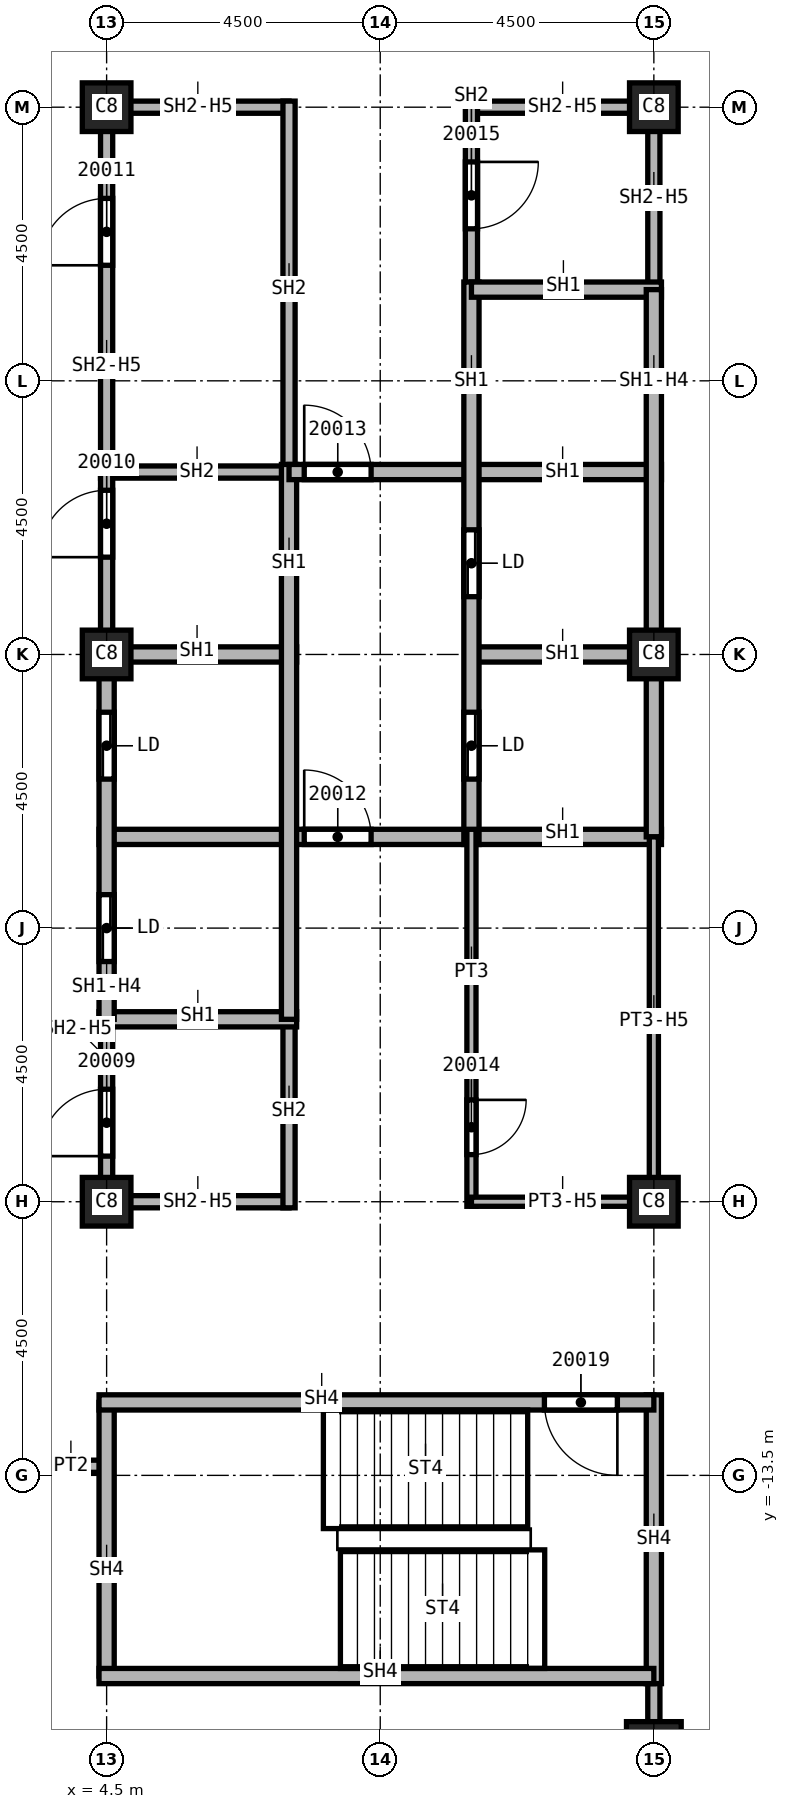
"""IFC4 building model, lengths in metres.
Left out: names, types, materials, properties, quantities, classifications, styles, units other than length and angle.
Written with IfcOpenShell. Run it as: python <this file> out.ifc"""

import sys

from ifc_helpers import new_model, si_unit, direction, frame, frame_2d, origin, origin_2d, place, context, subcontext, project, spatial, rectangle, extrude, element, fill, save


model = new_model("IFC4")
c1 = context("Model", 3, precision=1e-05, world=origin(), true_north=direction((0.0, 1.0)))
c2 = subcontext(c1, "Body", "Model", "MODEL_VIEW")
j1 = project(units=[si_unit("LENGTHUNIT", "METRE"), si_unit("PLANEANGLEUNIT", "RADIAN")], contexts=[c1])
p1 = place(None, origin())
s1 = spatial("IfcSite", under=j1, at=p1, CompositionType="ELEMENT")
p2 = place(p1, origin())
s2 = spatial("IfcBuilding", under=s1, at=p2, CompositionType="ELEMENT")
p3 = place(p2, frame((0.0, 0.0, 290.0)))
s3 = spatial("IfcBuildingStorey", under=s2, at=p3, CompositionType="ELEMENT", Elevation=290.0)
p4 = place(p3, frame((13.5, -18.0, 0.0), z_axis=(0.0, 0.0, 1.0), x_axis=(1.0, 0.0, 0.0)))
e1 = element("IfcColumn", 1, at=p4, inside=s3, PredefinedType="COLUMN", context=c2, shape_type="SweptSolid", body=[
    extrude(rectangle(XDim=0.9, YDim=0.9, at=origin_2d()), origin(), (0.0, 0.0, 1.0), 3.59),
])
for number, where, z_axis, x_axis in (
    (2, (4.5, 0.0, 0.0), (0.0, 0.0, 1.0), (1.0, 0.0, 0.0)),
    (3, (4.5, 9.0, 0.0), (0.0, 0.0, 1.0), (1.0, 0.0, 0.0)),
    (4, (4.5, -9.0, 0.0), (0.0, 0.0, 1.0), (1.0, 0.0, 0.0)),
    (5, (13.5, 0.0, 0.0), (0.0, 0.0, 1.0), (1.0, 0.0, 0.0)),
    (6, (13.5, 9.0, 0.0), (0.0, 0.0, 1.0), (1.0, 0.0, 0.0)),
    (7, (13.5, -9.0, 0.0), (0.0, 0.0, 1.0), (1.0, 0.0, 0.0)),
):
    element("IfcColumn", number, at=place(p3, frame(where, z_axis=z_axis, x_axis=x_axis)), inside=s3, PredefinedType="COLUMN", context=c2, shape_type="SweptSolid", body=[
        extrude(rectangle(XDim=0.8, YDim=0.8, at=origin_2d()), origin(), (0.0, 0.0, 1.0), 3.59),
    ])
p5 = place(p3, frame((4.5, -13.35, 0.0), z_axis=(0.0, 0.0, 1.0), x_axis=(-1.0, 0.0, 0.0)))
e8 = element("IfcWall", 8, at=p5, inside=s3, PredefinedType="PARTITIONING", context=c2, shape_type="SweptSolid", body=[
    extrude(rectangle(XDim=1.05, YDim=0.2, at=frame_2d((0.525, 0.0))), origin(), (0.0, 0.0, 1.0), 3.59),
])
p6 = place(p3, frame((13.5, -21.9, 0.0), z_axis=(0.0, 0.0, 1.0), x_axis=(0.0, 1.0, 0.0)))
e9 = element("IfcWall", 9, at=p6, inside=s3, PredefinedType="PARTITIONING", context=c2, shape_type="SweptSolid", body=[
    extrude(rectangle(XDim=5.225, YDim=0.2, at=frame_2d((2.612, 0.0))), origin(), (0.0, 0.0, 1.0), 3.59),
])
p7 = place(p6, frame((0.4, 0.0, 0.0)))
e10 = element("IfcOpeningElement", 10, at=p7, cuts=e9, PredefinedType="OPENING", context=c2, shape_type="SweptSolid", body=[
    extrude(rectangle(XDim=1.0, YDim=2.1, at=frame_2d((0.5, 1.05))), frame((0.0, 0.1, 0.0), z_axis=(0.0, -1.0, 0.0), x_axis=(1.0, 0.0, 0.0)), (0.0, 0.0, 1.0), 0.2),
])
p8 = place(p3, frame((4.4, 3.0, 0.0), z_axis=(0.0, 0.0, 1.0), x_axis=(1.0, 0.0, 0.0)))
e11 = element("IfcWall", 11, at=p8, inside=s3, PredefinedType="SOLIDWALL", context=c2, shape_type="SweptSolid", body=[
    extrude(rectangle(XDim=3.225, YDim=0.2, at=frame_2d((1.613, 0.0))), origin(), (0.0, 0.0, 1.0), 3.59),
])
p9 = place(p3, frame((4.5, -9.1, 0.0), z_axis=(0.0, 0.0, 1.0), x_axis=(0.0, 1.0, 0.0)))
e12 = element("IfcWall", 12, at=p9, inside=s3, PredefinedType="SOLIDWALL", context=c2, shape_type="SweptSolid", body=[
    extrude(rectangle(XDim=3.1, YDim=0.2, at=frame_2d((1.55, 0.0))), origin(), (0.0, 0.0, 1.0), 2.828),
])
p10 = place(p9, frame((0.85, 0.0, 0.0)))
e13 = element("IfcOpeningElement", 13, at=p10, cuts=e12, PredefinedType="OPENING", context=c2, shape_type="SweptSolid", body=[
    extrude(rectangle(XDim=1.1, YDim=2.1, at=frame_2d((0.55, 1.05))), frame((0.0, 0.1, 0.0), z_axis=(0.0, -1.0, 0.0), x_axis=(1.0, 0.0, 0.0)), (0.0, 0.0, 1.0), 0.2),
])
p11 = place(p3, frame((4.5, 0.0, 0.0), z_axis=(0.0, 0.0, 1.0), x_axis=(0.0, 1.0, 0.0)))
e14 = element("IfcWall", 14, at=p11, inside=s3, PredefinedType="SOLIDWALL", context=c2, shape_type="SweptSolid", body=[
    extrude(rectangle(XDim=9.1, YDim=0.2, at=frame_2d((4.55, 0.0))), origin(), (0.0, 0.0, 1.0), 2.828),
])
p12 = place(p11, frame((1.6, 0.0, 0.0)))
e15 = element("IfcOpeningElement", 15, at=p12, cuts=e14, PredefinedType="OPENING", context=c2, shape_type="SweptSolid", body=[
    extrude(rectangle(XDim=1.1, YDim=2.1, at=frame_2d((0.55, 1.05))), frame((0.0, 0.1, 0.0), z_axis=(0.0, -1.0, 0.0), x_axis=(1.0, 0.0, 0.0)), (0.0, 0.0, 1.0), 0.2),
])
p13 = place(p11, frame((6.4, 0.0, 0.0)))
e16 = element("IfcOpeningElement", 16, at=p13, cuts=e14, PredefinedType="OPENING", context=c2, shape_type="SweptSolid", body=[
    extrude(rectangle(XDim=1.1, YDim=2.1, at=frame_2d((0.55, 1.05))), frame((0.0, 0.1, 0.0), z_axis=(0.0, -1.0, 0.0), x_axis=(1.0, 0.0, 0.0)), (0.0, 0.0, 1.0), 0.2),
])
for number, where, z_axis, x_axis in (
    (17, (4.5, 9.0, 0.0), (0.0, 0.0, 1.0), (1.0, 0.0, 0.0)),
    (18, (7.5, -9.0, 0.0), (0.0, 0.0, 1.0), (-1.0, 0.0, 0.0)),
):
    element("IfcWall", number, at=place(p3, frame(where, z_axis=z_axis, x_axis=x_axis)), inside=s3, PredefinedType="SOLIDWALL", context=c2, shape_type="SweptSolid", body=[
        extrude(rectangle(XDim=3.0, YDim=0.2, at=frame_2d((1.5, 0.0))), origin(), (0.0, 0.0, 1.0), 2.828),
    ])
p14 = place(p3, frame((7.5, -6.0, 0.0), z_axis=(0.0, 0.0, 1.0), x_axis=(0.0, -1.0, 0.0)))
e19 = element("IfcWall", 19, at=p14, inside=s3, PredefinedType="SOLIDWALL", context=c2, shape_type="SweptSolid", body=[
    extrude(rectangle(XDim=3.1, YDim=0.2, at=frame_2d((1.55, 0.0))), origin(), (0.0, 0.0, 1.0), 3.59),
])
p15 = place(p3, frame((7.5, 9.1, 0.0), z_axis=(0.0, 0.0, 1.0), x_axis=(0.0, -1.0, 0.0)))
e20 = element("IfcWall", 20, at=p15, inside=s3, PredefinedType="SOLIDWALL", context=c2, shape_type="SweptSolid", body=[
    extrude(rectangle(XDim=6.225, YDim=0.2, at=frame_2d((3.113, 0.0))), origin(), (0.0, 0.0, 1.0), 3.59),
])
p16 = place(p3, frame((10.5, 9.0, 0.0), z_axis=(0.0, 0.0, 1.0), x_axis=(1.0, 0.0, 0.0)))
e21 = element("IfcWall", 21, at=p16, inside=s3, PredefinedType="SOLIDWALL", context=c2, shape_type="SweptSolid", body=[
    extrude(rectangle(XDim=3.0, YDim=0.2, at=frame_2d((1.5, 0.0))), origin(), (0.0, 0.0, 1.0), 2.828),
])
p17 = place(p3, frame((10.5, 9.1, 0.0), z_axis=(0.0, 0.0, 1.0), x_axis=(0.0, -1.0, 0.0)))
e22 = element("IfcWall", 22, at=p17, inside=s3, PredefinedType="SOLIDWALL", context=c2, shape_type="SweptSolid", body=[
    extrude(rectangle(XDim=3.225, YDim=0.2, at=frame_2d((1.613, 0.0))), origin(), (0.0, 0.0, 1.0), 3.59),
])
p18 = place(p17, frame((1.0, 0.0, 0.0)))
e23 = element("IfcOpeningElement", 23, at=p18, cuts=e22, PredefinedType="OPENING", context=c2, shape_type="SweptSolid", body=[
    extrude(rectangle(XDim=1.1, YDim=2.1, at=frame_2d((0.55, 1.05))), frame((0.0, 0.1, 0.0), z_axis=(0.0, -1.0, 0.0), x_axis=(1.0, 0.0, 0.0)), (0.0, 0.0, 1.0), 0.2),
])
p19 = place(p3, frame((13.5, 9.1, 0.0), z_axis=(0.0, 0.0, 1.0), x_axis=(0.0, -1.0, 0.0)))
e24 = element("IfcWall", 24, at=p19, inside=s3, PredefinedType="SOLIDWALL", context=c2, shape_type="SweptSolid", body=[
    extrude(rectangle(XDim=3.1, YDim=0.2, at=frame_2d((1.55, 0.0))), origin(), (0.0, 0.0, 1.0), 2.828),
])
p20 = place(p3, frame((4.375, -6.0, 0.0), z_axis=(0.0, 0.0, 1.0), x_axis=(1.0, 0.0, 0.0)))
e25 = element("IfcWall", 25, at=p20, inside=s3, PredefinedType="SOLIDWALL", context=c2, shape_type="SweptSolid", body=[
    extrude(rectangle(XDim=3.25, YDim=0.25, at=frame_2d((1.625, 0.0))), origin(), (0.0, 0.0, 1.0), 3.59),
])
p21 = place(p3, frame((4.375, -3.0, 0.0), z_axis=(0.0, 0.0, 1.0), x_axis=(1.0, 0.0, 0.0)))
e26 = element("IfcWall", 26, at=p21, inside=s3, PredefinedType="SOLIDWALL", context=c2, shape_type="SweptSolid", body=[
    extrude(rectangle(XDim=9.25, YDim=0.25, at=frame_2d((4.625, 0.0))), origin(), (0.0, 0.0, 1.0), 3.59),
])
p22 = place(p21, frame((3.375, 0.0, 0.0)))
e27 = element("IfcOpeningElement", 27, at=p22, cuts=e26, PredefinedType="OPENING", context=c2, shape_type="SweptSolid", body=[
    extrude(rectangle(XDim=1.1, YDim=2.1, at=frame_2d((0.55, 1.05))), frame((0.0, 0.125, 0.0), z_axis=(0.0, -1.0, 0.0), x_axis=(1.0, 0.0, 0.0)), (0.0, 0.0, 1.0), 0.25),
])
p23 = place(p3, frame((4.375, 0.0, 0.0), z_axis=(0.0, 0.0, 1.0), x_axis=(1.0, 0.0, 0.0)))
e28 = element("IfcWall", 28, at=p23, inside=s3, PredefinedType="SOLIDWALL", context=c2, shape_type="SweptSolid", body=[
    extrude(rectangle(XDim=3.25, YDim=0.25, at=frame_2d((1.625, 0.0))), origin(), (0.0, 0.0, 1.0), 3.59),
])
p24 = place(p3, frame((4.5, -6.0, 0.0), z_axis=(0.0, 0.0, 1.0), x_axis=(0.0, 1.0, 0.0)))
e29 = element("IfcWall", 29, at=p24, inside=s3, PredefinedType="SOLIDWALL", context=c2, shape_type="SweptSolid", body=[
    extrude(rectangle(XDim=6.0, YDim=0.25, at=frame_2d((3.0, 0.0))), origin(), (0.0, 0.0, 1.0), 2.828),
])
p25 = place(p24, frame((0.95, 0.0, 0.0)))
e30 = element("IfcOpeningElement", 30, at=p25, cuts=e29, PredefinedType="OPENING", context=c2, shape_type="SweptSolid", body=[
    extrude(rectangle(XDim=1.1, YDim=2.1, at=frame_2d((0.55, 1.05))), frame((0.0, 0.125, 0.0), z_axis=(0.0, -1.0, 0.0), x_axis=(1.0, 0.0, 0.0)), (0.0, 0.0, 1.0), 0.25),
])
p26 = place(p24, frame((3.95, 0.0, 0.0)))
e31 = element("IfcOpeningElement", 31, at=p26, cuts=e29, PredefinedType="OPENING", context=c2, shape_type="SweptSolid", body=[
    extrude(rectangle(XDim=1.1, YDim=2.1, at=frame_2d((0.55, 1.05))), frame((0.0, 0.125, 0.0), z_axis=(0.0, -1.0, 0.0), x_axis=(1.0, 0.0, 0.0)), (0.0, 0.0, 1.0), 0.25),
])
p27 = place(p3, frame((7.5, 3.125, 0.0), z_axis=(0.0, 0.0, 1.0), x_axis=(0.0, -1.0, 0.0)))
e32 = element("IfcWall", 32, at=p27, inside=s3, PredefinedType="SOLIDWALL", context=c2, shape_type="SweptSolid", body=[
    extrude(rectangle(XDim=9.125, YDim=0.25, at=frame_2d((4.562, 0.0))), origin(), (0.0, 0.0, 1.0), 3.59),
])
p28 = place(p3, frame((7.5, 3.0, 0.0), z_axis=(0.0, 0.0, 1.0), x_axis=(1.0, 0.0, 0.0)))
e33 = element("IfcWall", 33, at=p28, inside=s3, PredefinedType="SOLIDWALL", context=c2, shape_type="SweptSolid", body=[
    extrude(rectangle(XDim=6.125, YDim=0.25, at=frame_2d((3.062, 0.0))), origin(), (0.0, 0.0, 1.0), 3.59),
])
p29 = place(p28, frame((0.25, 0.0, 0.0)))
e34 = element("IfcOpeningElement", 34, at=p29, cuts=e33, PredefinedType="OPENING", context=c2, shape_type="SweptSolid", body=[
    extrude(rectangle(XDim=1.1, YDim=2.1, at=frame_2d((0.55, 1.05))), frame((0.0, 0.125, 0.0), z_axis=(0.0, -1.0, 0.0), x_axis=(1.0, 0.0, 0.0)), (0.0, 0.0, 1.0), 0.25),
])
p30 = place(p3, frame((10.5, 0.0, 0.0), z_axis=(0.0, 0.0, 1.0), x_axis=(1.0, 0.0, 0.0)))
e35 = element("IfcWall", 35, at=p30, inside=s3, PredefinedType="SOLIDWALL", context=c2, shape_type="SweptSolid", body=[
    extrude(rectangle(XDim=3.125, YDim=0.25, at=frame_2d((1.562, 0.0))), origin(), (0.0, 0.0, 1.0), 3.59),
])
p31 = place(p3, frame((10.5, 6.125, 0.0), z_axis=(0.0, 0.0, 1.0), x_axis=(0.0, -1.0, 0.0)))
e36 = element("IfcWall", 36, at=p31, inside=s3, PredefinedType="SOLIDWALL", context=c2, shape_type="SweptSolid", body=[
    extrude(rectangle(XDim=9.25, YDim=0.25, at=frame_2d((4.625, 0.0))), origin(), (0.0, 0.0, 1.0), 3.59),
])
p32 = place(p31, frame((7.075, 0.0, 0.0)))
e37 = element("IfcOpeningElement", 37, at=p32, cuts=e36, PredefinedType="OPENING", context=c2, shape_type="SweptSolid", body=[
    extrude(rectangle(XDim=1.1, YDim=2.1, at=frame_2d((0.55, 1.05))), frame((0.0, 0.125, 0.0), z_axis=(0.0, -1.0, 0.0), x_axis=(1.0, 0.0, 0.0)), (0.0, 0.0, 1.0), 0.25),
])
p33 = place(p31, frame((4.075, 0.0, 0.0)))
e38 = element("IfcOpeningElement", 38, at=p33, cuts=e36, PredefinedType="OPENING", context=c2, shape_type="SweptSolid", body=[
    extrude(rectangle(XDim=1.1, YDim=2.1, at=frame_2d((0.55, 1.05))), frame((0.0, 0.125, 0.0), z_axis=(0.0, -1.0, 0.0), x_axis=(1.0, 0.0, 0.0)), (0.0, 0.0, 1.0), 0.25),
])
p34 = place(p3, frame((10.5, 6.0, 0.0), z_axis=(0.0, 0.0, 1.0), x_axis=(1.0, 0.0, 0.0)))
e39 = element("IfcWall", 39, at=p34, inside=s3, PredefinedType="SOLIDWALL", context=c2, shape_type="SweptSolid", body=[
    extrude(rectangle(XDim=3.125, YDim=0.25, at=frame_2d((1.562, 0.0))), origin(), (0.0, 0.0, 1.0), 3.59),
])
p35 = place(p3, frame((13.5, 6.0, 0.0), z_axis=(0.0, 0.0, 1.0), x_axis=(0.0, -1.0, 0.0)))
e40 = element("IfcWall", 40, at=p35, inside=s3, PredefinedType="SOLIDWALL", context=c2, shape_type="SweptSolid", body=[
    extrude(rectangle(XDim=9.0, YDim=0.25, at=frame_2d((4.5, 0.0))), origin(), (0.0, 0.0, 1.0), 2.828),
])
p36 = place(p3, frame((4.5, -16.8, 0.0), z_axis=(0.0, 0.0, 1.0), x_axis=(0.0, 1.0, 0.0)))
e41 = element("IfcWall", 41, at=p36, inside=s3, PredefinedType="SOLIDWALL", context=c2, shape_type="SweptSolid", body=[
    extrude(rectangle(XDim=4.5, YDim=0.25, at=frame_2d((2.25, 0.0))), origin(), (0.0, 0.0, 1.0), 3.59),
])
p37 = place(p3, frame((13.5, -16.925, 0.0), z_axis=(0.0, 0.0, 1.0), x_axis=(0.0, 1.0, 0.0)))
e42 = element("IfcWall", 42, at=p37, inside=s3, PredefinedType="SOLIDWALL", context=c2, shape_type="SweptSolid", body=[
    extrude(rectangle(XDim=4.75, YDim=0.25, at=frame_2d((2.375, 0.0))), origin(), (0.0, 0.0, 1.0), 3.59),
])
p38 = place(p3, frame((13.5, -16.8, 0.0), z_axis=(0.0, 0.0, 1.0), x_axis=(-1.0, 0.0, 0.0)))
e43 = element("IfcWall", 43, at=p38, inside=s3, PredefinedType="SOLIDWALL", context=c2, shape_type="SweptSolid", body=[
    extrude(rectangle(XDim=9.125, YDim=0.25, at=frame_2d((4.562, 0.0))), origin(), (0.0, 0.0, 1.0), 3.59),
])
p39 = place(p3, frame((13.5, -12.3, 0.0), z_axis=(0.0, 0.0, 1.0), x_axis=(-1.0, 0.0, 0.0)))
e44 = element("IfcWall", 44, at=p39, inside=s3, PredefinedType="SOLIDWALL", context=c2, shape_type="SweptSolid", body=[
    extrude(rectangle(XDim=9.125, YDim=0.25, at=frame_2d((4.562, 0.0))), origin(), (0.0, 0.0, 1.0), 3.59),
])
p40 = place(p39, frame((0.6, 0.0, 0.0)))
e45 = element("IfcOpeningElement", 45, at=p40, cuts=e44, PredefinedType="OPENING", context=c2, shape_type="SweptSolid", body=[
    extrude(rectangle(XDim=1.2, YDim=2.1, at=frame_2d((0.6, 1.05))), frame((0.0, 0.125, 0.0), z_axis=(0.0, -1.0, 0.0), x_axis=(1.0, 0.0, 0.0)), (0.0, 0.0, 1.0), 0.25),
])
p41 = place(p3, frame((10.5, -2.875, 0.0), z_axis=(0.0, 0.0, 1.0), x_axis=(0.0, -1.0, 0.0)))
e46 = element("IfcWall", 46, at=p41, inside=s3, PredefinedType="PARTITIONING", context=c2, shape_type="SweptSolid", body=[
    extrude(rectangle(XDim=6.2, YDim=0.15, at=frame_2d((3.1, 0.0))), origin(), (0.0, 0.0, 1.0), 3.59),
])
p42 = place(p41, frame((4.45, 0.0, 0.0)))
e47 = element("IfcOpeningElement", 47, at=p42, cuts=e46, PredefinedType="OPENING", context=c2, shape_type="SweptSolid", body=[
    extrude(rectangle(XDim=0.9, YDim=2.1, at=frame_2d((0.45, 1.05))), frame((0.0, 0.075, 0.0), z_axis=(0.0, -1.0, 0.0), x_axis=(1.0, 0.0, 0.0)), (0.0, 0.0, 1.0), 0.15),
])
p43 = place(p3, frame((13.5, -9.0, 0.0), z_axis=(0.0, 0.0, 1.0), x_axis=(-1.0, 0.0, 0.0)))
e48 = element("IfcWall", 48, at=p43, inside=s3, PredefinedType="PARTITIONING", context=c2, shape_type="SweptSolid", body=[
    extrude(rectangle(XDim=3.0, YDim=0.15, at=frame_2d((1.5, 0.0))), origin(), (0.0, 0.0, 1.0), 2.828),
])
p44 = place(p3, frame((13.5, -3.0, 0.0), z_axis=(0.0, 0.0, 1.0), x_axis=(0.0, -1.0, 0.0)))
e49 = element("IfcWall", 49, at=p44, inside=s3, PredefinedType="PARTITIONING", context=c2, shape_type="SweptSolid", body=[
    extrude(rectangle(XDim=6.075, YDim=0.15, at=frame_2d((3.038, 0.0))), origin(), (0.0, 0.0, 1.0), 2.828),
])
p45 = place(p10, origin())
e50 = element("IfcDoor", 50, at=p45, inside=s3, OperationType="SINGLE_SWING_RIGHT", PredefinedType="DOOR", context=c2, shape_type="SweptSolid", body=[
    extrude(rectangle(XDim=1.1, YDim=2.1, at=frame_2d((0.55, 1.05))), frame((0.0, 0.025, 0.0), z_axis=(0.0, -1.0, 0.0), x_axis=(1.0, 0.0, 0.0)), (0.0, 0.0, 1.0), 0.05),
])
fill(e13, e50)
p46 = place(p12, origin())
e51 = element("IfcDoor", 51, at=p46, inside=s3, OperationType="SINGLE_SWING_LEFT", PredefinedType="DOOR", context=c2, shape_type="SweptSolid", body=[
    extrude(rectangle(XDim=1.1, YDim=2.1, at=frame_2d((0.55, 1.05))), frame((0.0, 0.025, 0.0), z_axis=(0.0, -1.0, 0.0), x_axis=(1.0, 0.0, 0.0)), (0.0, 0.0, 1.0), 0.05),
])
fill(e15, e51)
p47 = place(p13, origin())
e52 = element("IfcDoor", 52, at=p47, inside=s3, OperationType="SINGLE_SWING_RIGHT", PredefinedType="DOOR", context=c2, shape_type="SweptSolid", body=[
    extrude(rectangle(XDim=1.1, YDim=2.1, at=frame_2d((0.55, 1.05))), frame((0.0, 0.025, 0.0), z_axis=(0.0, -1.0, 0.0), x_axis=(1.0, 0.0, 0.0)), (0.0, 0.0, 1.0), 0.05),
])
fill(e16, e52)
p48 = place(p22, origin())
e53 = element("IfcDoor", 53, at=p48, inside=s3, OperationType="SINGLE_SWING_LEFT", PredefinedType="DOOR", context=c2, shape_type="SweptSolid", body=[
    extrude(rectangle(XDim=1.1, YDim=2.1, at=frame_2d((0.55, 1.05))), frame((0.0, 0.025, 0.0), z_axis=(0.0, -1.0, 0.0), x_axis=(1.0, 0.0, 0.0)), (0.0, 0.0, 1.0), 0.05),
])
fill(e27, e53)
p49 = place(p29, origin())
e54 = element("IfcDoor", 54, at=p49, inside=s3, OperationType="SINGLE_SWING_RIGHT", PredefinedType="DOOR", context=c2, shape_type="SweptSolid", body=[
    extrude(rectangle(XDim=1.1, YDim=2.1, at=frame_2d((0.55, 1.05))), frame((0.0, 0.025, 0.0), z_axis=(0.0, -1.0, 0.0), x_axis=(1.0, 0.0, 0.0)), (0.0, 0.0, 1.0), 0.05),
])
fill(e34, e54)
p50 = place(p42, origin())
e55 = element("IfcDoor", 55, at=p50, inside=s3, OperationType="SINGLE_SWING_LEFT", PredefinedType="DOOR", context=c2, shape_type="SweptSolid", body=[
    extrude(rectangle(XDim=0.9, YDim=2.1, at=frame_2d((0.45, 1.05))), frame((0.0, 0.025, 0.0), z_axis=(0.0, -1.0, 0.0), x_axis=(1.0, 0.0, 0.0)), (0.0, 0.0, 1.0), 0.05),
])
fill(e47, e55)
p51 = place(p18, origin())
e56 = element("IfcDoor", 56, at=p51, inside=s3, OperationType="SINGLE_SWING_RIGHT", PredefinedType="DOOR", context=c2, shape_type="SweptSolid", body=[
    extrude(rectangle(XDim=1.1, YDim=2.1, at=frame_2d((0.55, 1.05))), frame((0.0, 0.025, 0.0), z_axis=(0.0, -1.0, 0.0), x_axis=(1.0, 0.0, 0.0)), (0.0, 0.0, 1.0), 0.05),
])
fill(e23, e56)
p52 = place(p40, origin())
e57 = element("IfcDoor", 57, at=p52, inside=s3, OperationType="SINGLE_SWING_RIGHT", PredefinedType="DOOR", context=c2, shape_type="SweptSolid", body=[
    extrude(rectangle(XDim=1.2, YDim=2.1, at=frame_2d((0.6, 1.05))), frame((0.0, 0.025, 0.0), z_axis=(0.0, -1.0, 0.0), x_axis=(1.0, 0.0, 0.0)), (0.0, 0.0, 1.0), 0.05),
])
fill(e45, e57)
p53 = place(p25, origin())
e58 = element("IfcDoor", 58, at=p53, inside=s3, OperationType="SLIDING_TO_LEFT", PredefinedType="DOOR", context=c2, shape_type="SweptSolid", body=[
    extrude(rectangle(XDim=1.1, YDim=2.1, at=frame_2d((0.55, 1.05))), frame((0.0, 0.025, 0.0), z_axis=(0.0, -1.0, 0.0), x_axis=(1.0, 0.0, 0.0)), (0.0, 0.0, 1.0), 0.05),
])
fill(e30, e58)
p54 = place(p26, origin())
e59 = element("IfcDoor", 59, at=p54, inside=s3, OperationType="SLIDING_TO_LEFT", PredefinedType="DOOR", context=c2, shape_type="SweptSolid", body=[
    extrude(rectangle(XDim=1.1, YDim=2.1, at=frame_2d((0.55, 1.05))), frame((0.0, 0.025, 0.0), z_axis=(0.0, -1.0, 0.0), x_axis=(1.0, 0.0, 0.0)), (0.0, 0.0, 1.0), 0.05),
])
fill(e31, e59)
p55 = place(p32, origin())
e60 = element("IfcDoor", 60, at=p55, inside=s3, OperationType="SLIDING_TO_LEFT", PredefinedType="DOOR", context=c2, shape_type="SweptSolid", body=[
    extrude(rectangle(XDim=1.1, YDim=2.1, at=frame_2d((0.55, 1.05))), frame((0.0, 0.025, 0.0), z_axis=(0.0, -1.0, 0.0), x_axis=(1.0, 0.0, 0.0)), (0.0, 0.0, 1.0), 0.05),
])
fill(e37, e60)
p56 = place(p33, origin())
e61 = element("IfcDoor", 61, at=p56, inside=s3, OperationType="SLIDING_TO_LEFT", PredefinedType="DOOR", context=c2, shape_type="SweptSolid", body=[
    extrude(rectangle(XDim=1.1, YDim=2.1, at=frame_2d((0.55, 1.05))), frame((0.0, 0.025, 0.0), z_axis=(0.0, -1.0, 0.0), x_axis=(1.0, 0.0, 0.0)), (0.0, 0.0, 1.0), 0.05),
])
fill(e38, e61)
save(model, sys.argv[1])
